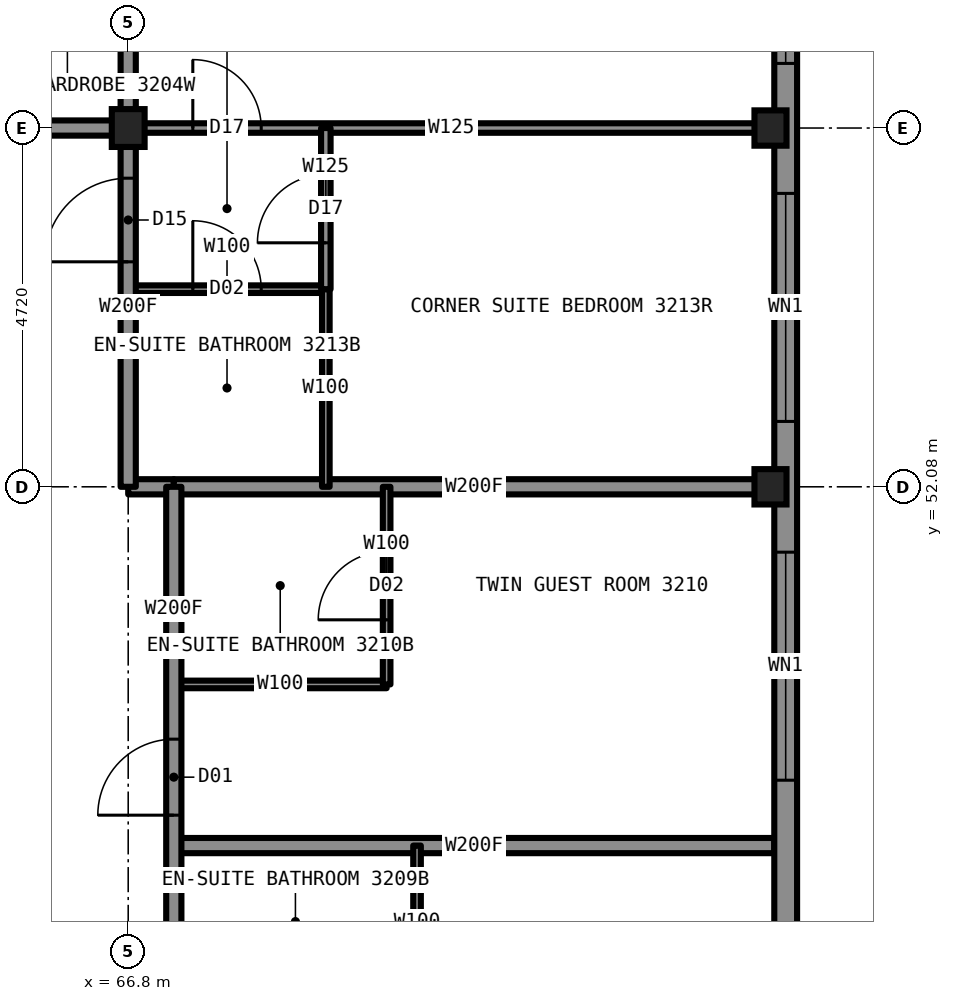
"""IFC4 building model, lengths in metres.
Left out: names, types, materials, properties, quantities, classifications, styles, units other than length and angle.
Written with IfcOpenShell. Run it as: python <this file> out.ifc"""

import sys

from ifc_helpers import new_model, si_unit, direction, frame, frame_2d, origin, origin_2d, place, context, subcontext, project, spatial, rectangle, i_section, extrude, element, fill, save


model = new_model("IFC4")
c1 = context("Model", 3, precision=1e-05, world=origin(), true_north=direction((0.0, 1.0)))
c2 = subcontext(c1, "Body", "Model", "MODEL_VIEW")
j1 = project(units=[si_unit("LENGTHUNIT", "METRE"), si_unit("PLANEANGLEUNIT", "RADIAN")], contexts=[c1])
p1 = place(None, origin())
s1 = spatial("IfcSite", under=j1, at=p1, CompositionType="ELEMENT")
p2 = place(p1, origin())
s2 = spatial("IfcBuilding", under=s1, at=p2, CompositionType="ELEMENT")
p3 = place(p2, frame((0.0, 0.0, 114.4)))
s3 = spatial("IfcBuildingStorey", under=s2, at=p3, CompositionType="ELEMENT", Elevation=114.4)
for number, where, z_axis, x_axis in (
    (1, (75.25, 52.08, 0.0), (0.0, 0.0, 1.0), (1.0, 0.0, 0.0)),
    (2, (75.25, 56.8, 0.0), (0.0, 0.0, 1.0), (1.0, 0.0, 0.0)),
):
    element("IfcColumn", number, at=place(p3, frame(where, z_axis=z_axis, x_axis=x_axis)), inside=s3, PredefinedType="COLUMN", context=c2, shape_type="SweptSolid", body=[
        extrude(i_section(OverallWidth=0.422, OverallDepth=0.465, WebThickness=0.045, FlangeThickness=0.073, at=origin_2d()), origin(), (0.0, 0.0, 1.0), 3.5),
    ])
p4 = place(p3, frame((66.8, 56.8, 0.0), z_axis=(0.0, 0.0, 1.0), x_axis=(1.0, 0.0, 0.0)))
e3 = element("IfcColumn", 3, at=p4, inside=s3, PredefinedType="COLUMN", context=c2, shape_type="SweptSolid", body=[
    extrude(i_section(OverallWidth=0.432, OverallDepth=0.498, WebThickness=0.056, FlangeThickness=0.089, at=origin_2d()), origin(), (0.0, 0.0, 1.0), 3.5),
])
p5 = place(p3, frame((43.2, 56.8, 0.0), z_axis=(0.0, 0.0, 1.0), x_axis=(1.0, 0.0, 0.0)))
e4 = element("IfcWall", 4, at=p5, inside=s3, PredefinedType="PARTITIONING", context=c2, shape_type="SweptSolid", body=[
    extrude(rectangle(XDim=23.6, YDim=0.2, at=frame_2d((11.8, 0.0))), origin(), (0.0, 0.0, 1.0), 3.33),
])
p6 = place(p5, frame((2.26, 0.0, 0.0)))
e5 = element("IfcOpeningElement", 5, at=p6, cuts=e4, PredefinedType="OPENING", context=c2, shape_type="SweptSolid", body=[
    extrude(rectangle(XDim=1.0, YDim=2.2, at=frame_2d((0.5, 1.1))), frame((0.0, 0.11, 0.0), z_axis=(0.0, -1.0, 0.0), x_axis=(1.0, 0.0, 0.0)), (0.0, 0.0, 1.0), 0.22),
])
p7 = place(p5, frame((6.18, 0.0, 0.0)))
e6 = element("IfcOpeningElement", 6, at=p7, cuts=e4, PredefinedType="OPENING", context=c2, shape_type="SweptSolid", body=[
    extrude(rectangle(XDim=1.0, YDim=2.2, at=frame_2d((0.5, 1.1))), frame((0.0, 0.11, 0.0), z_axis=(0.0, -1.0, 0.0), x_axis=(1.0, 0.0, 0.0)), (0.0, 0.0, 1.0), 0.22),
])
p8 = place(p5, frame((11.99, 0.0, 0.0)))
e7 = element("IfcOpeningElement", 7, at=p8, cuts=e4, PredefinedType="OPENING", context=c2, shape_type="SweptSolid", body=[
    extrude(rectangle(XDim=1.0, YDim=2.2, at=frame_2d((0.5, 1.1))), frame((0.0, 0.11, 0.0), z_axis=(0.0, -1.0, 0.0), x_axis=(1.0, 0.0, 0.0)), (0.0, 0.0, 1.0), 0.22),
])
p9 = place(p5, frame((17.16, 0.0, 0.0)))
e8 = element("IfcOpeningElement", 8, at=p9, cuts=e4, PredefinedType="OPENING", context=c2, shape_type="SweptSolid", body=[
    extrude(rectangle(XDim=1.0, YDim=2.2, at=frame_2d((0.5, 1.1))), frame((0.0, 0.11, 0.0), z_axis=(0.0, -1.0, 0.0), x_axis=(1.0, 0.0, 0.0)), (0.0, 0.0, 1.0), 0.22),
])
p10 = place(p3, frame((66.8, 56.8, 0.0), z_axis=(0.0, 0.0, 1.0), x_axis=(1.0, 0.0, 0.0)))
e9 = element("IfcWall", 9, at=p10, inside=s3, PredefinedType="PARTITIONING", context=c2, shape_type="SweptSolid", body=[
    extrude(rectangle(XDim=8.5, YDim=0.125, at=frame_2d((4.25, 0.0))), origin(), (0.0, 0.0, 1.0), 2.573),
])
p11 = place(p10, frame((0.85, 0.0, 0.0)))
e10 = element("IfcOpeningElement", 10, at=p11, cuts=e9, PredefinedType="OPENING", context=c2, shape_type="SweptSolid", body=[
    extrude(rectangle(XDim=0.9, YDim=2.2, at=frame_2d((0.45, 1.1))), frame((0.0, 0.073, 0.0), z_axis=(0.0, -1.0, 0.0), x_axis=(1.0, 0.0, 0.0)), (0.0, 0.0, 1.0), 0.145),
])
p12 = place(p3, frame((67.4, 47.36, 0.0), z_axis=(0.0, 0.0, 1.0), x_axis=(1.0, 0.0, 0.0)))
e11 = element("IfcWall", 11, at=p12, inside=s3, PredefinedType="PARTITIONING", context=c2, shape_type="SweptSolid", body=[
    extrude(rectangle(XDim=7.9, YDim=0.2, at=frame_2d((3.95, 0.0))), origin(), (0.0, 0.0, 1.0), 2.731),
])
p13 = place(p3, frame((67.4, 49.48, 0.0), z_axis=(0.0, 0.0, 1.0), x_axis=(1.0, 0.0, 0.0)))
e12 = element("IfcWall", 12, at=p13, inside=s3, PredefinedType="PARTITIONING", context=c2, shape_type="SweptSolid", body=[
    extrude(rectangle(XDim=2.8, YDim=0.1, at=frame_2d((1.4, 0.0))), origin(), (0.0, 0.0, 1.0), 3.33),
])
p14 = place(p3, frame((66.8, 52.08, 0.0), z_axis=(0.0, 0.0, 1.0), x_axis=(1.0, 0.0, 0.0)))
e13 = element("IfcWall", 13, at=p14, inside=s3, PredefinedType="PARTITIONING", context=c2, shape_type="SweptSolid", body=[
    extrude(rectangle(XDim=0.6, YDim=0.2, at=frame_2d((0.3, 0.0))), origin(), (0.0, 0.0, 1.0), 2.573),
])
p15 = place(p3, frame((67.4, 52.08, 0.0), z_axis=(0.0, 0.0, 1.0), x_axis=(1.0, 0.0, 0.0)))
e14 = element("IfcWall", 14, at=p15, inside=s3, PredefinedType="PARTITIONING", context=c2, shape_type="SweptSolid", body=[
    extrude(rectangle(XDim=7.9, YDim=0.2, at=frame_2d((3.95, 0.0))), origin(), (0.0, 0.0, 1.0), 2.573),
])
p16 = place(p3, frame((66.8, 54.68, 0.0), z_axis=(0.0, 0.0, 1.0), x_axis=(1.0, 0.0, 0.0)))
e15 = element("IfcWall", 15, at=p16, inside=s3, PredefinedType="PARTITIONING", context=c2, shape_type="SweptSolid", body=[
    extrude(rectangle(XDim=2.6, YDim=0.1, at=frame_2d((1.3, 0.0))), origin(), (0.0, 0.0, 1.0), 3.33),
])
p17 = place(p16, frame((0.85, 0.0, 0.0)))
e16 = element("IfcOpeningElement", 16, at=p17, cuts=e15, PredefinedType="OPENING", context=c2, shape_type="SweptSolid", body=[
    extrude(rectangle(XDim=0.9, YDim=2.1, at=frame_2d((0.45, 1.05))), frame((0.0, 0.06, 0.0), z_axis=(0.0, -1.0, 0.0), x_axis=(1.0, 0.0, 0.0)), (0.0, 0.0, 1.0), 0.12),
])
p18 = place(p3, frame((66.8, 52.08, 0.0), z_axis=(0.0, 0.0, 1.0), x_axis=(0.0, 1.0, 0.0)))
e17 = element("IfcWall", 17, at=p18, inside=s3, PredefinedType="PARTITIONING", context=c2, shape_type="SweptSolid", body=[
    extrude(rectangle(XDim=4.72, YDim=0.2, at=frame_2d((2.36, 0.0))), origin(), (0.0, 0.0, 1.0), 3.33),
])
p19 = place(p18, frame((2.96, 0.0, 0.0)))
e18 = element("IfcOpeningElement", 18, at=p19, cuts=e17, PredefinedType="OPENING", context=c2, shape_type="SweptSolid", body=[
    extrude(rectangle(XDim=1.1, YDim=2.2, at=frame_2d((0.55, 1.1))), frame((0.0, 0.11, 0.0), z_axis=(0.0, -1.0, 0.0), x_axis=(1.0, 0.0, 0.0)), (0.0, 0.0, 1.0), 0.22),
])
p20 = place(p3, frame((66.8, 56.8, 0.0), z_axis=(0.0, 0.0, 1.0), x_axis=(0.0, 1.0, 0.0)))
e19 = element("IfcWall", 19, at=p20, inside=s3, PredefinedType="PARTITIONING", context=c2, shape_type="SweptSolid", body=[
    extrude(rectangle(XDim=8.5, YDim=0.2, at=frame_2d((4.25, 0.0))), origin(), (0.0, 0.0, 1.0), 2.573),
])
p21 = place(p3, frame((67.4, 37.92, 0.0), z_axis=(0.0, 0.0, 1.0), x_axis=(0.0, 1.0, 0.0)))
e20 = element("IfcWall", 20, at=p21, inside=s3, PredefinedType="PARTITIONING", context=c2, shape_type="SweptSolid", body=[
    extrude(rectangle(XDim=14.16, YDim=0.2, at=frame_2d((7.08, 0.0))), origin(), (0.0, 0.0, 1.0), 3.33),
])
p22 = place(p21, frame((2.55, 0.0, 0.0)))
e21 = element("IfcOpeningElement", 21, at=p22, cuts=e20, PredefinedType="OPENING", context=c2, shape_type="SweptSolid", body=[
    extrude(rectangle(XDim=1.0, YDim=2.2, at=frame_2d((0.5, 1.1))), frame((0.0, 0.11, 0.0), z_axis=(0.0, -1.0, 0.0), x_axis=(1.0, 0.0, 0.0)), (0.0, 0.0, 1.0), 0.22),
])
p23 = place(p21, frame((6.18, 0.0, 0.0)))
e22 = element("IfcOpeningElement", 22, at=p23, cuts=e20, PredefinedType="OPENING", context=c2, shape_type="SweptSolid", body=[
    extrude(rectangle(XDim=1.0, YDim=2.2, at=frame_2d((0.5, 1.1))), frame((0.0, 0.11, 0.0), z_axis=(0.0, -1.0, 0.0), x_axis=(1.0, 0.0, 0.0)), (0.0, 0.0, 1.0), 0.22),
])
p24 = place(p21, frame((9.84, 0.0, 0.0)))
e23 = element("IfcOpeningElement", 23, at=p24, cuts=e20, PredefinedType="OPENING", context=c2, shape_type="SweptSolid", body=[
    extrude(rectangle(XDim=1.0, YDim=2.2, at=frame_2d((0.5, 1.1))), frame((0.0, 0.11, 0.0), z_axis=(0.0, -1.0, 0.0), x_axis=(1.0, 0.0, 0.0)), (0.0, 0.0, 1.0), 0.22),
])
p25 = place(p3, frame((69.4, 52.08, 0.0), z_axis=(0.0, 0.0, 1.0), x_axis=(0.0, 1.0, 0.0)))
e24 = element("IfcWall", 24, at=p25, inside=s3, PredefinedType="PARTITIONING", context=c2, shape_type="SweptSolid", body=[
    extrude(rectangle(XDim=2.6, YDim=0.1, at=frame_2d((1.3, 0.0))), origin(), (0.0, 0.0, 1.0), 3.33),
])
p26 = place(p3, frame((69.4, 54.68, 0.0), z_axis=(0.0, 0.0, 1.0), x_axis=(0.0, 1.0, 0.0)))
e25 = element("IfcWall", 25, at=p26, inside=s3, PredefinedType="PARTITIONING", context=c2, shape_type="SweptSolid", body=[
    extrude(rectangle(XDim=2.12, YDim=0.125, at=frame_2d((1.06, 0.0))), origin(), (0.0, 0.0, 1.0), 3.33),
])
p27 = place(p26, frame((0.61, 0.0, 0.0)))
e26 = element("IfcOpeningElement", 26, at=p27, cuts=e25, PredefinedType="OPENING", context=c2, shape_type="SweptSolid", body=[
    extrude(rectangle(XDim=0.9, YDim=2.2, at=frame_2d((0.45, 1.1))), frame((0.0, 0.073, 0.0), z_axis=(0.0, -1.0, 0.0), x_axis=(1.0, 0.0, 0.0)), (0.0, 0.0, 1.0), 0.145),
])
p28 = place(p3, frame((70.2, 49.48, 0.0), z_axis=(0.0, 0.0, 1.0), x_axis=(0.0, 1.0, 0.0)))
e27 = element("IfcWall", 27, at=p28, inside=s3, PredefinedType="PARTITIONING", context=c2, shape_type="SweptSolid", body=[
    extrude(rectangle(XDim=2.6, YDim=0.1, at=frame_2d((1.3, 0.0))), origin(), (0.0, 0.0, 1.0), 3.33),
])
p29 = place(p28, frame((0.85, 0.0, 0.0)))
e28 = element("IfcOpeningElement", 28, at=p29, cuts=e27, PredefinedType="OPENING", context=c2, shape_type="SweptSolid", body=[
    extrude(rectangle(XDim=0.9, YDim=2.1, at=frame_2d((0.45, 1.05))), frame((0.0, 0.06, 0.0), z_axis=(0.0, -1.0, 0.0), x_axis=(1.0, 0.0, 0.0)), (0.0, 0.0, 1.0), 0.12),
])
p30 = place(p3, frame((70.6, 45.36, 0.0), z_axis=(0.0, 0.0, 1.0), x_axis=(0.0, 1.0, 0.0)))
e29 = element("IfcWall", 29, at=p30, inside=s3, PredefinedType="PARTITIONING", context=c2, shape_type="SweptSolid", body=[
    extrude(rectangle(XDim=2.0, YDim=0.1, at=frame_2d((1.0, 0.0))), origin(), (0.0, 0.0, 1.0), 3.33),
])
p31 = place(p3, frame((75.45, 29.9, 0.0), z_axis=(0.0, 0.0, 1.0), x_axis=(0.0, 1.0, 0.0)))
e30 = element("IfcWall", 30, at=p31, inside=s3, PredefinedType="SOLIDWALL", context=c2, shape_type="SweptSolid", body=[
    extrude(rectangle(XDim=30.2, YDim=0.3, at=frame_2d((15.1, 0.0))), origin(), (0.0, 0.0, 1.0), 2.83),
])
p32 = place(p31, frame((0.85, 0.0, 0.5)))
e31 = element("IfcOpeningElement", 31, at=p32, cuts=e30, PredefinedType="OPENING", context=c2, shape_type="SweptSolid", body=[
    extrude(rectangle(XDim=1.6, YDim=2.0, at=frame_2d((0.8, 1.0))), frame((0.0, 0.16, 0.0), z_axis=(0.0, -1.0, 0.0), x_axis=(1.0, 0.0, 0.0)), (0.0, 0.0, 1.0), 0.32),
])
p33 = place(p31, frame((4.16, 0.0, 0.5)))
e32 = element("IfcOpeningElement", 32, at=p33, cuts=e30, PredefinedType="OPENING", context=c2, shape_type="SweptSolid", body=[
    extrude(rectangle(XDim=3.0, YDim=2.0, at=frame_2d((1.5, 1.0))), frame((0.0, 0.16, 0.0), z_axis=(0.0, -1.0, 0.0), x_axis=(1.0, 0.0, 0.0)), (0.0, 0.0, 1.0), 0.32),
])
p34 = place(p31, frame((10.53, 0.0, 0.5)))
e33 = element("IfcOpeningElement", 33, at=p34, cuts=e30, PredefinedType="OPENING", context=c2, shape_type="SweptSolid", body=[
    extrude(rectangle(XDim=1.3, YDim=1.9, at=frame_2d((0.65, 0.95))), frame((0.0, 0.16, 0.0), z_axis=(0.0, -1.0, 0.0), x_axis=(1.0, 0.0, 0.0)), (0.0, 0.0, 1.0), 0.32),
])
p35 = place(p31, frame((13.6, 0.0, 0.5)))
e34 = element("IfcOpeningElement", 34, at=p35, cuts=e30, PredefinedType="OPENING", context=c2, shape_type="SweptSolid", body=[
    extrude(rectangle(XDim=3.0, YDim=2.0, at=frame_2d((1.5, 1.0))), frame((0.0, 0.16, 0.0), z_axis=(0.0, -1.0, 0.0), x_axis=(1.0, 0.0, 0.0)), (0.0, 0.0, 1.0), 0.32),
])
p36 = place(p31, frame((18.32, 0.0, 0.5)))
e35 = element("IfcOpeningElement", 35, at=p36, cuts=e30, PredefinedType="OPENING", context=c2, shape_type="SweptSolid", body=[
    extrude(rectangle(XDim=1.3, YDim=1.9, at=frame_2d((0.65, 0.95))), frame((0.0, 0.16, 0.0), z_axis=(0.0, -1.0, 0.0), x_axis=(1.0, 0.0, 0.0)), (0.0, 0.0, 1.0), 0.32),
])
p37 = place(p31, frame((23.04, 0.0, 0.5)))
e36 = element("IfcOpeningElement", 36, at=p37, cuts=e30, PredefinedType="OPENING", context=c2, shape_type="SweptSolid", body=[
    extrude(rectangle(XDim=3.0, YDim=2.0, at=frame_2d((1.5, 1.0))), frame((0.0, 0.16, 0.0), z_axis=(0.0, -1.0, 0.0), x_axis=(1.0, 0.0, 0.0)), (0.0, 0.0, 1.0), 0.32),
])
p38 = place(p31, frame((27.75, 0.0, 0.5)))
e37 = element("IfcOpeningElement", 37, at=p38, cuts=e30, PredefinedType="OPENING", context=c2, shape_type="SweptSolid", body=[
    extrude(rectangle(XDim=1.6, YDim=2.0, at=frame_2d((0.8, 1.0))), frame((0.0, 0.16, 0.0), z_axis=(0.0, -1.0, 0.0), x_axis=(1.0, 0.0, 0.0)), (0.0, 0.0, 1.0), 0.32),
])
p39 = place(p31, frame((9.88, 0.0, 0.5)))
e38 = element("IfcOpeningElement", 38, at=p39, cuts=e30, PredefinedType="OPENING", context=c2, shape_type="SweptSolid", body=[
    extrude(rectangle(XDim=0.6, YDim=0.9, at=frame_2d((0.3, 0.45))), frame((0.0, 0.16, 0.0), z_axis=(0.0, -1.0, 0.0), x_axis=(1.0, 0.0, 0.0)), (0.0, 0.0, 1.0), 0.32),
])
p40 = place(p31, frame((19.67, 0.0, 0.5)))
e39 = element("IfcOpeningElement", 39, at=p40, cuts=e30, PredefinedType="OPENING", context=c2, shape_type="SweptSolid", body=[
    extrude(rectangle(XDim=0.6, YDim=0.9, at=frame_2d((0.3, 0.45))), frame((0.0, 0.16, 0.0), z_axis=(0.0, -1.0, 0.0), x_axis=(1.0, 0.0, 0.0)), (0.0, 0.0, 1.0), 0.32),
])
p41 = place(p24, origin())
e40 = element("IfcDoor", 40, at=p41, inside=s3, OperationType="SINGLE_SWING_LEFT", PredefinedType="DOOR", context=c2, shape_type="SweptSolid", body=[
    extrude(rectangle(XDim=1.0, YDim=2.2, at=frame_2d((0.5, 1.1))), frame((0.0, 0.025, 0.0), z_axis=(0.0, -1.0, 0.0), x_axis=(1.0, 0.0, 0.0)), (0.0, 0.0, 1.0), 0.05),
])
fill(e23, e40)
p42 = place(p29, origin())
e41 = element("IfcDoor", 41, at=p42, inside=s3, OperationType="SINGLE_SWING_RIGHT", PredefinedType="DOOR", context=c2, shape_type="SweptSolid", body=[
    extrude(rectangle(XDim=0.9, YDim=2.1, at=frame_2d((0.45, 1.05))), frame((0.0, 0.025, 0.0), z_axis=(0.0, -1.0, 0.0), x_axis=(1.0, 0.0, 0.0)), (0.0, 0.0, 1.0), 0.05),
])
fill(e28, e41)
p43 = place(p11, origin())
e42 = element("IfcDoor", 42, at=p43, inside=s3, OperationType="SINGLE_SWING_LEFT", PredefinedType="DOOR", context=c2, shape_type="SweptSolid", body=[
    extrude(rectangle(XDim=0.9, YDim=2.2, at=frame_2d((0.45, 1.1))), frame((0.0, 0.025, 0.0), z_axis=(0.0, -1.0, 0.0), x_axis=(1.0, 0.0, 0.0)), (0.0, 0.0, 1.0), 0.05),
])
fill(e10, e42)
p44 = place(p17, origin())
e43 = element("IfcDoor", 43, at=p44, inside=s3, OperationType="SINGLE_SWING_RIGHT", PredefinedType="DOOR", context=c2, shape_type="SweptSolid", body=[
    extrude(rectangle(XDim=0.9, YDim=2.1, at=frame_2d((0.45, 1.05))), frame((0.0, 0.025, 0.0), z_axis=(0.0, -1.0, 0.0), x_axis=(1.0, 0.0, 0.0)), (0.0, 0.0, 1.0), 0.05),
])
fill(e16, e43)
p45 = place(p19, origin())
e44 = element("IfcDoor", 44, at=p45, inside=s3, OperationType="SINGLE_SWING_LEFT", PredefinedType="DOOR", context=c2, shape_type="SweptSolid", body=[
    extrude(rectangle(XDim=1.1, YDim=2.2, at=frame_2d((0.55, 1.1))), frame((0.0, 0.025, 0.0), z_axis=(0.0, -1.0, 0.0), x_axis=(1.0, 0.0, 0.0)), (0.0, 0.0, 1.0), 0.05),
])
fill(e18, e44)
p46 = place(p27, origin())
e45 = element("IfcDoor", 45, at=p46, inside=s3, OperationType="SINGLE_SWING_LEFT", PredefinedType="DOOR", context=c2, shape_type="SweptSolid", body=[
    extrude(rectangle(XDim=0.9, YDim=2.2, at=frame_2d((0.45, 1.1))), frame((0.0, 0.025, 0.0), z_axis=(0.0, -1.0, 0.0), x_axis=(1.0, 0.0, 0.0)), (0.0, 0.0, 1.0), 0.05),
])
fill(e26, e45)
p47 = place(p35, origin())
e46 = element("IfcWindow", 46, at=p47, inside=s3, PartitioningType="SINGLE_PANEL", PredefinedType="WINDOW", context=c2, shape_type="SweptSolid", body=[
    extrude(rectangle(XDim=3.0, YDim=2.0, at=frame_2d((1.5, 1.0))), frame((0.0, 0.03, 0.0), z_axis=(0.0, -1.0, 0.0), x_axis=(1.0, 0.0, 0.0)), (0.0, 0.0, 1.0), 0.06),
])
fill(e34, e46)
p48 = place(p36, origin())
e47 = element("IfcWindow", 47, at=p48, inside=s3, PartitioningType="SINGLE_PANEL", PredefinedType="WINDOW", context=c2, shape_type="SweptSolid", body=[
    extrude(rectangle(XDim=1.3, YDim=1.9, at=frame_2d((0.65, 0.95))), frame((0.0, 0.03, 0.0), z_axis=(0.0, -1.0, 0.0), x_axis=(1.0, 0.0, 0.0)), (0.0, 0.0, 1.0), 0.06),
])
fill(e35, e47)
p49 = place(p37, origin())
e48 = element("IfcWindow", 48, at=p49, inside=s3, PartitioningType="SINGLE_PANEL", PredefinedType="WINDOW", context=c2, shape_type="SweptSolid", body=[
    extrude(rectangle(XDim=3.0, YDim=2.0, at=frame_2d((1.5, 1.0))), frame((0.0, 0.03, 0.0), z_axis=(0.0, -1.0, 0.0), x_axis=(1.0, 0.0, 0.0)), (0.0, 0.0, 1.0), 0.06),
])
fill(e36, e48)
p50 = place(p38, origin())
e49 = element("IfcWindow", 49, at=p50, inside=s3, PartitioningType="SINGLE_PANEL", PredefinedType="WINDOW", context=c2, shape_type="SweptSolid", body=[
    extrude(rectangle(XDim=1.6, YDim=2.0, at=frame_2d((0.8, 1.0))), frame((0.0, 0.03, 0.0), z_axis=(0.0, -1.0, 0.0), x_axis=(1.0, 0.0, 0.0)), (0.0, 0.0, 1.0), 0.06),
])
fill(e37, e49)
p51 = place(p40, origin())
e50 = element("IfcWindow", 50, at=p51, inside=s3, PartitioningType="SINGLE_PANEL", PredefinedType="WINDOW", context=c2, shape_type="SweptSolid", body=[
    extrude(rectangle(XDim=0.6, YDim=0.9, at=frame_2d((0.3, 0.45))), frame((0.0, 0.03, 0.0), z_axis=(0.0, -1.0, 0.0), x_axis=(1.0, 0.0, 0.0)), (0.0, 0.0, 1.0), 0.06),
])
fill(e39, e50)
save(model, sys.argv[1])
